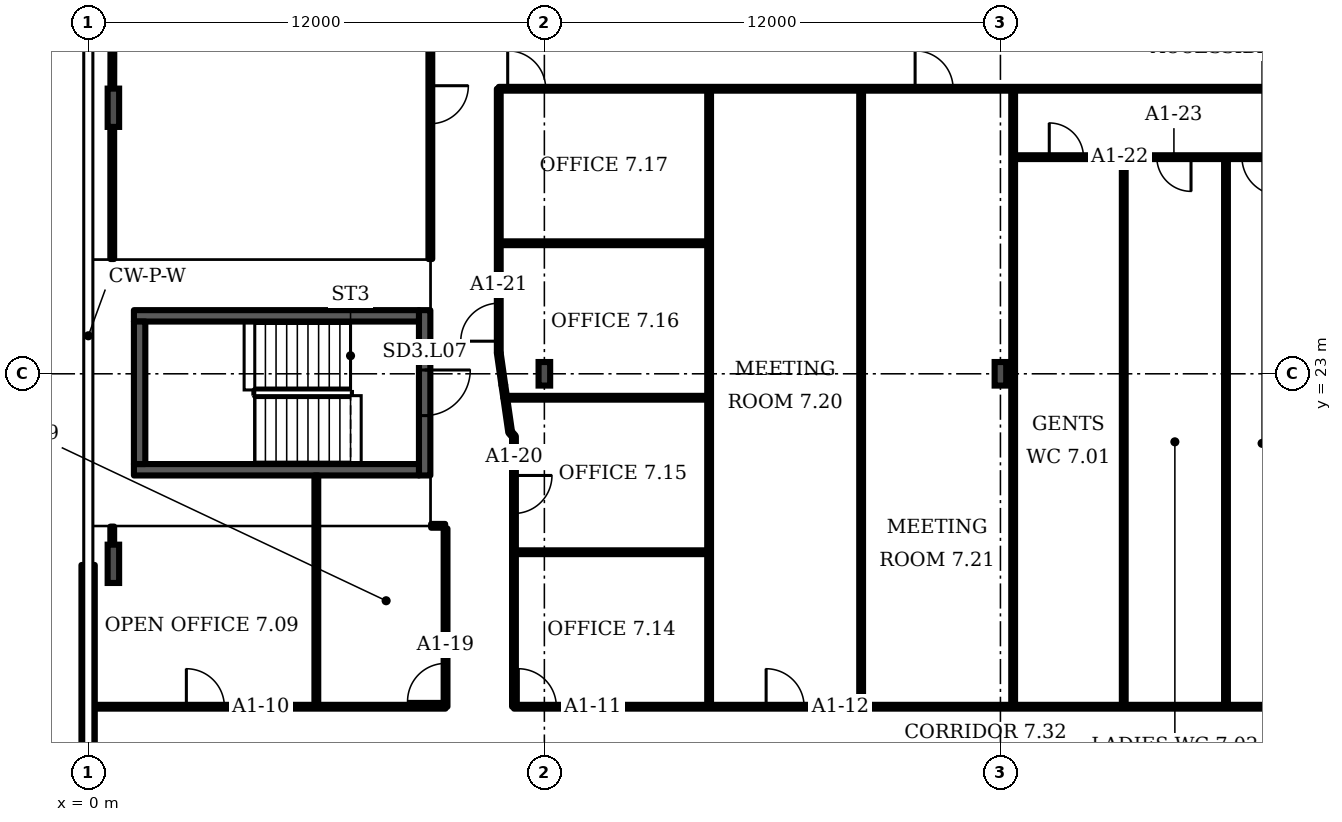
"""IFC4 building model, lengths in metres.
Left out: names, types, materials, properties, quantities, classifications, styles, units other than length and angle.
Written with IfcOpenShell. Run it as: python <this file> out.ifc"""

import sys

from ifc_helpers import new_model, si_unit, direction, frame, frame_2d, origin, origin_2d, place, context, subcontext, project, spatial, rectangle, i_section, extrude, element, fill, save


model = new_model("IFC4")
c1 = context("Model", 3, precision=1e-05, world=origin(), true_north=direction((0.0, 1.0)))
c2 = subcontext(c1, "Body", "Model", "MODEL_VIEW")
j1 = project(units=[si_unit("LENGTHUNIT", "METRE"), si_unit("PLANEANGLEUNIT", "RADIAN")], contexts=[c1])
p1 = place(None, origin())
s1 = spatial("IfcSite", under=j1, at=p1, CompositionType="ELEMENT")
p2 = place(p1, origin())
s2 = spatial("IfcBuilding", under=s1, at=p2, CompositionType="ELEMENT")
p3 = place(p2, frame((0.0, 0.0, 45.1)))
s3 = spatial("IfcBuildingStorey", under=s2, at=p3, CompositionType="ELEMENT", Elevation=45.1)
for number, where, z_axis, x_axis in (
    (1, (0.66, 30.0, 0.0), (0.0, 0.0, 1.0), (-1.0, 0.0, 0.0)),
    (2, (0.66, 18.0, 0.0), (0.0, 0.0, 1.0), (-1.0, 0.0, 0.0)),
):
    element("IfcColumn", number, at=place(p3, frame(where, z_axis=z_axis, x_axis=x_axis)), inside=s3, PredefinedType="COLUMN", context=c2, shape_type="SweptSolid", body=[
        extrude(i_section(OverallWidth=0.302, OverallDepth=1.008, WebThickness=0.021, FlangeThickness=0.04, FilletRadius=0.03, at=origin_2d()), origin(), (0.0, 0.0, 1.0), 3.6),
    ])
for number, where, z_axis, x_axis in (
    (3, (12.0, 23.0, 0.0), (0.0, 0.0, 1.0), (1.0, 0.0, 0.0)),
    (4, (24.0, 23.0, 0.0), (0.0, 0.0, 1.0), (1.0, 0.0, 0.0)),
):
    element("IfcColumn", number, at=place(p3, frame(where, z_axis=z_axis, x_axis=x_axis)), inside=s3, PredefinedType="COLUMN", context=c2, shape_type="SweptSolid", body=[
        extrude(i_section(OverallWidth=0.305, OverallDepth=0.62, WebThickness=0.021, FlangeThickness=0.04, FilletRadius=0.027, at=origin_2d()), origin(), (0.0, 0.0, 1.0), 3.6),
    ])
p4 = place(p3, frame((-0.005, 17.97, 0.0), z_axis=(0.0, 0.0, 1.0), x_axis=(0.0, -1.0, 0.0)))
e5 = element("IfcWall", 5, at=p4, inside=s3, PredefinedType="SOLIDWALL", context=c2, shape_type="SweptSolid", body=[
    extrude(rectangle(XDim=12.15, YDim=0.35, at=frame_2d((6.075, 0.0))), origin(), (0.0, 0.0, 1.0), 1.0),
])
p5 = place(p3, frame((8.85, 20.325, 0.0), z_axis=(0.0, 0.0, 1.0), x_axis=(0.0, 1.0, 0.0)))
e6 = element("IfcWall", 6, at=p5, inside=s3, PredefinedType="SHEAR", context=c2, shape_type="SweptSolid", body=[
    extrude(rectangle(XDim=4.35, YDim=0.3, at=frame_2d((2.175, 0.0))), origin(), (0.0, 0.0, 1.0), 3.2),
])
p6 = place(p5, frame((1.575, 0.0, 0.0)))
e7 = element("IfcOpeningElement", 7, at=p6, cuts=e6, PredefinedType="OPENING", context=c2, shape_type="SweptSolid", body=[
    extrude(rectangle(XDim=1.2, YDim=2.1, at=frame_2d((0.6, 1.05))), frame((0.0, 0.16, 0.0), z_axis=(0.0, -1.0, 0.0), x_axis=(1.0, 0.0, 0.0)), (0.0, 0.0, 1.0), 0.32),
])
p7 = place(p3, frame((0.02, 14.24, 0.0), z_axis=(0.0, 0.0, 1.0), x_axis=(1.0, 0.0, 0.0)))
e8 = element("IfcWall", 8, at=p7, inside=s3, PredefinedType="PARTITIONING", context=c2, shape_type="SweptSolid", body=[
    extrude(rectangle(XDim=9.38, YDim=0.1, at=frame_2d((4.69, 0.0))), origin(), (0.0, 0.0, 1.0), 3.2),
])
p8 = place(p7, frame((2.56, 0.0, 0.0)))
e9 = element("IfcOpeningElement", 9, at=p8, cuts=e8, PredefinedType="OPENING", context=c2, shape_type="SweptSolid", body=[
    extrude(rectangle(XDim=1.0, YDim=2.1, at=frame_2d((0.5, 1.05))), frame((0.0, 0.06, 0.0), z_axis=(0.0, -1.0, 0.0), x_axis=(1.0, 0.0, 0.0)), (0.0, 0.0, 1.0), 0.12),
])
p9 = place(p3, frame((0.63, 17.5, 0.0), z_axis=(0.0, 0.0, 1.0), x_axis=(0.0, 1.0, 0.0)))
e10 = element("IfcWall", 10, at=p9, inside=s3, PredefinedType="PARTITIONING", context=c2, shape_type="SweptSolid", body=[
    extrude(rectangle(XDim=1.48, YDim=0.1, at=frame_2d((0.74, 0.0))), origin(), (0.0, 0.0, 1.0), 2.58),
])
p10 = place(p3, frame((0.63, 26.02, 0.0), z_axis=(0.0, 0.0, 1.0), x_axis=(0.0, 1.0, 0.0)))
e11 = element("IfcWall", 11, at=p10, inside=s3, PredefinedType="PARTITIONING", context=c2, shape_type="SweptSolid", body=[
    extrude(rectangle(XDim=3.98, YDim=0.1, at=frame_2d((1.99, 0.0))), origin(), (0.0, 0.0, 1.0), 2.58),
])
p11 = place(p3, frame((0.63, 30.0, 0.0), z_axis=(0.0, 0.0, 1.0), x_axis=(0.00218, 0.999994, 0.0)))
e12 = element("IfcWall", 12, at=p11, inside=s3, PredefinedType="PARTITIONING", context=c2, shape_type="SweptSolid", body=[
    extrude(rectangle(XDim=11.535, YDim=0.1, at=frame_2d((5.768, 0.0))), origin(), (0.0, 0.0, 1.0), 2.58),
])
p12 = place(p3, frame((6.0, 14.24, 0.0), z_axis=(0.0, 0.0, 1.0), x_axis=(0.0, 1.0, 0.0)))
e13 = element("IfcWall", 13, at=p12, inside=s3, PredefinedType="PARTITIONING", context=c2, shape_type="SweptSolid", body=[
    extrude(rectangle(XDim=6.085, YDim=0.1, at=frame_2d((3.042, 0.0))), origin(), (0.0, 0.0, 1.0), 3.2),
])
p13 = place(p3, frame((9.0, 26.02, 0.0), z_axis=(0.0, 0.0, 1.0), x_axis=(0.0, 1.0, 0.0)))
e14 = element("IfcWall", 14, at=p13, inside=s3, PredefinedType="PARTITIONING", context=c2, shape_type="SweptSolid", body=[
    extrude(rectangle(XDim=7.96, YDim=0.1, at=frame_2d((3.98, 0.0))), origin(), (0.0, 0.0, 1.0), 3.2),
])
p14 = place(p13, frame((3.56, 0.0, 0.0)))
e15 = element("IfcOpeningElement", 15, at=p14, cuts=e14, PredefinedType="OPENING", context=c2, shape_type="SweptSolid", body=[
    extrude(rectangle(XDim=1.0, YDim=2.1, at=frame_2d((0.5, 1.05))), frame((0.0, 0.06, 0.0), z_axis=(0.0, -1.0, 0.0), x_axis=(1.0, 0.0, 0.0)), (0.0, 0.0, 1.0), 0.12),
])
p15 = place(p3, frame((9.02, 19.0, 0.0), z_axis=(0.0, 0.0, 1.0), x_axis=(1.0, 0.0, 0.0)))
e16 = element("IfcWall", 16, at=p15, inside=s3, PredefinedType="PARTITIONING", context=c2, shape_type="SweptSolid", body=[
    extrude(rectangle(XDim=0.37, YDim=0.1, at=frame_2d((0.185, 0.0))), origin(), (0.0, 0.0, 1.0), 3.2),
])
p16 = place(p3, frame((9.4, 14.24, 0.0), z_axis=(0.0, 0.0, 1.0), x_axis=(0.0, 1.0, 0.0)))
e17 = element("IfcWall", 17, at=p16, inside=s3, PredefinedType="PARTITIONING", context=c2, shape_type="SweptSolid", body=[
    extrude(rectangle(XDim=4.69, YDim=0.1, at=frame_2d((2.345, 0.0))), origin(), (0.0, 0.0, 1.0), 3.2),
])
p17 = place(p16, frame((0.14, 0.0, 0.0)))
e18 = element("IfcOpeningElement", 18, at=p17, cuts=e17, PredefinedType="OPENING", context=c2, shape_type="SweptSolid", body=[
    extrude(rectangle(XDim=1.0, YDim=2.1, at=frame_2d((0.5, 1.05))), frame((0.0, 0.06, 0.0), z_axis=(0.0, -1.0, 0.0), x_axis=(1.0, 0.0, 0.0)), (0.0, 0.0, 1.0), 0.12),
])
p18 = place(p3, frame((10.8, 23.55, 0.0), z_axis=(0.0, 0.0, 1.0), x_axis=(0.0, 1.0, 0.0)))
e19 = element("IfcWall", 19, at=p18, inside=s3, PredefinedType="PARTITIONING", context=c2, shape_type="SweptSolid", body=[
    extrude(rectangle(XDim=6.95, YDim=0.1, at=frame_2d((3.475, 0.0))), origin(), (0.0, 0.0, 1.0), 3.2),
])
p19 = place(p18, frame((0.308, 0.0, 0.0)))
e20 = element("IfcOpeningElement", 20, at=p19, cuts=e19, PredefinedType="OPENING", context=c2, shape_type="SweptSolid", body=[
    extrude(rectangle(XDim=1.0, YDim=2.1, at=frame_2d((0.5, 1.05))), frame((0.0, 0.06, 0.0), z_axis=(0.0, -1.0, 0.0), x_axis=(1.0, 0.0, 0.0)), (0.0, 0.0, 1.0), 0.12),
])
p20 = place(p3, frame((10.8, 26.435, 0.0), z_axis=(0.0, 0.0, 1.0), x_axis=(1.0, 0.0, 0.0)))
e21 = element("IfcWall", 21, at=p20, inside=s3, PredefinedType="PARTITIONING", context=c2, shape_type="SweptSolid", body=[
    extrude(rectangle(XDim=5.535, YDim=0.1, at=frame_2d((2.768, 0.0))), origin(), (0.0, 0.0, 1.0), 3.2),
])
p21 = place(p3, frame((10.8, 30.5, 0.0), z_axis=(0.0, 0.0, 1.0), x_axis=(1.0, 0.0, 0.0)))
e22 = element("IfcWall", 22, at=p21, inside=s3, PredefinedType="PARTITIONING", context=c2, shape_type="SweptSolid", body=[
    extrude(rectangle(XDim=26.05, YDim=0.1, at=frame_2d((13.025, 0.0))), origin(), (0.0, 0.0, 1.0), 3.2),
])
p22 = place(p21, frame((0.235, 0.0, 0.0)))
e23 = element("IfcOpeningElement", 23, at=p22, cuts=e22, PredefinedType="OPENING", context=c2, shape_type="SweptSolid", body=[
    extrude(rectangle(XDim=1.0, YDim=2.1, at=frame_2d((0.5, 1.05))), frame((0.0, 0.06, 0.0), z_axis=(0.0, -1.0, 0.0), x_axis=(1.0, 0.0, 0.0)), (0.0, 0.0, 1.0), 0.12),
])
p23 = place(p21, frame((10.955, 0.0, 0.0)))
e24 = element("IfcOpeningElement", 24, at=p23, cuts=e22, PredefinedType="OPENING", context=c2, shape_type="SweptSolid", body=[
    extrude(rectangle(XDim=1.0, YDim=2.1, at=frame_2d((0.5, 1.05))), frame((0.0, 0.06, 0.0), z_axis=(0.0, -1.0, 0.0), x_axis=(1.0, 0.0, 0.0)), (0.0, 0.0, 1.0), 0.12),
])
p24 = place(p3, frame((10.92, 22.705, 0.0), z_axis=(0.0, 0.0, 1.0), x_axis=(-0.14046, 0.990086, 0.0)))
e25 = element("IfcWall", 25, at=p24, inside=s3, PredefinedType="PARTITIONING", context=c2, shape_type="SweptSolid", body=[
    extrude(rectangle(XDim=0.854, YDim=0.1, at=frame_2d((0.427, 0.0))), origin(), (0.0, 0.0, 1.0), 3.2),
])
p25 = place(p3, frame((10.97, 22.37, 0.0), z_axis=(0.0, 0.0, 1.0), x_axis=(-0.147776, 0.989018, 0.0)))
e26 = element("IfcWall", 26, at=p25, inside=s3, PredefinedType="PARTITIONING", context=c2, shape_type="SweptSolid", body=[
    extrude(rectangle(XDim=0.339, YDim=0.1, at=frame_2d((0.169, 0.0))), origin(), (0.0, 0.0, 1.0), 3.2),
])
p26 = place(p3, frame((10.97, 22.37, 0.0), z_axis=(0.0, 0.0, 1.0), x_axis=(1.0, 0.0, 0.0)))
e27 = element("IfcWall", 27, at=p26, inside=s3, PredefinedType="PARTITIONING", context=c2, shape_type="SweptSolid", body=[
    extrude(rectangle(XDim=5.365, YDim=0.1, at=frame_2d((2.683, 0.0))), origin(), (0.0, 0.0, 1.0), 3.2),
])
p27 = place(p3, frame((11.1, 21.465, 0.0), z_axis=(0.0, 0.0, 1.0), x_axis=(-0.142318, 0.989818, 0.0)))
e28 = element("IfcWall", 28, at=p27, inside=s3, PredefinedType="PARTITIONING", context=c2, shape_type="SweptSolid", body=[
    extrude(rectangle(XDim=0.914, YDim=0.1, at=frame_2d((0.457, 0.0))), origin(), (0.0, 0.0, 1.0), 3.2),
])
p28 = place(p3, frame((11.2, 14.24, 0.0), z_axis=(0.0, 0.0, 1.0), x_axis=(0.0, 1.0, 0.0)))
e29 = element("IfcWall", 29, at=p28, inside=s3, PredefinedType="PARTITIONING", context=c2, shape_type="SweptSolid", body=[
    extrude(rectangle(XDim=7.11, YDim=0.1, at=frame_2d((3.555, 0.0))), origin(), (0.0, 0.0, 1.0), 3.2),
])
p29 = place(p28, frame((5.085, 0.0, 0.0)))
e30 = element("IfcOpeningElement", 30, at=p29, cuts=e29, PredefinedType="OPENING", context=c2, shape_type="SweptSolid", body=[
    extrude(rectangle(XDim=1.0, YDim=2.1, at=frame_2d((0.5, 1.05))), frame((0.0, 0.06, 0.0), z_axis=(0.0, -1.0, 0.0), x_axis=(1.0, 0.0, 0.0)), (0.0, 0.0, 1.0), 0.12),
])
p30 = place(p3, frame((11.2, 14.24, 0.0), z_axis=(0.0, 0.0, 1.0), x_axis=(1.0, 0.0, 0.0)))
e31 = element("IfcWall", 31, at=p30, inside=s3, PredefinedType="PARTITIONING", context=c2, shape_type="SweptSolid", body=[
    extrude(rectangle(XDim=51.635, YDim=0.1, at=frame_2d((25.817, 0.0))), origin(), (0.0, 0.0, 1.0), 3.2),
])
p31 = place(p30, frame((0.115, 0.0, 0.0)))
e32 = element("IfcOpeningElement", 32, at=p31, cuts=e31, PredefinedType="OPENING", context=c2, shape_type="SweptSolid", body=[
    extrude(rectangle(XDim=1.0, YDim=2.1, at=frame_2d((0.5, 1.05))), frame((0.0, 0.06, 0.0), z_axis=(0.0, -1.0, 0.0), x_axis=(1.0, 0.0, 0.0)), (0.0, 0.0, 1.0), 0.12),
])
p32 = place(p30, frame((6.635, 0.0, 0.0)))
e33 = element("IfcOpeningElement", 33, at=p32, cuts=e31, PredefinedType="OPENING", context=c2, shape_type="SweptSolid", body=[
    extrude(rectangle(XDim=1.0, YDim=2.1, at=frame_2d((0.5, 1.05))), frame((0.0, 0.06, 0.0), z_axis=(0.0, -1.0, 0.0), x_axis=(1.0, 0.0, 0.0)), (0.0, 0.0, 1.0), 0.12),
])
p33 = place(p30, frame((22.7, 0.0, 0.0)))
e34 = element("IfcOpeningElement", 34, at=p33, cuts=e31, PredefinedType="OPENING", context=c2, shape_type="SweptSolid", body=[
    extrude(rectangle(XDim=1.0, YDim=2.1, at=frame_2d((0.5, 1.05))), frame((0.0, 0.06, 0.0), z_axis=(0.0, -1.0, 0.0), x_axis=(1.0, 0.0, 0.0)), (0.0, 0.0, 1.0), 0.12),
])
p34 = place(p30, frame((27.865, 0.0, 0.0)))
e35 = element("IfcOpeningElement", 35, at=p34, cuts=e31, PredefinedType="OPENING", context=c2, shape_type="SweptSolid", body=[
    extrude(rectangle(XDim=1.0, YDim=2.1, at=frame_2d((0.5, 1.05))), frame((0.0, 0.06, 0.0), z_axis=(0.0, -1.0, 0.0), x_axis=(1.0, 0.0, 0.0)), (0.0, 0.0, 1.0), 0.12),
])
p35 = place(p30, frame((34.065, 0.0, 0.0)))
e36 = element("IfcOpeningElement", 36, at=p35, cuts=e31, PredefinedType="OPENING", context=c2, shape_type="SweptSolid", body=[
    extrude(rectangle(XDim=1.8, YDim=2.1, at=frame_2d((0.9, 1.05))), frame((0.0, 0.06, 0.0), z_axis=(0.0, -1.0, 0.0), x_axis=(1.0, 0.0, 0.0)), (0.0, 0.0, 1.0), 0.12),
])
p36 = place(p30, frame((41.765, 0.0, 0.0)))
e37 = element("IfcOpeningElement", 37, at=p36, cuts=e31, PredefinedType="OPENING", context=c2, shape_type="SweptSolid", body=[
    extrude(rectangle(XDim=1.8, YDim=2.1, at=frame_2d((0.9, 1.05))), frame((0.0, 0.06, 0.0), z_axis=(0.0, -1.0, 0.0), x_axis=(1.0, 0.0, 0.0)), (0.0, 0.0, 1.0), 0.12),
])
p37 = place(p3, frame((11.2, 18.305, 0.0), z_axis=(0.0, 0.0, 1.0), x_axis=(1.0, 0.0, 0.0)))
e38 = element("IfcWall", 38, at=p37, inside=s3, PredefinedType="PARTITIONING", context=c2, shape_type="SweptSolid", body=[
    extrude(rectangle(XDim=5.135, YDim=0.1, at=frame_2d((2.567, 0.0))), origin(), (0.0, 0.0, 1.0), 3.2),
])
p38 = place(p3, frame((11.2, 21.35, 0.0), z_axis=(0.0, 0.0, 1.0), x_axis=(-0.65566, 0.755051, 0.0)))
e39 = element("IfcWall", 39, at=p38, inside=s3, PredefinedType="PARTITIONING", context=c2, shape_type="SweptSolid", body=[
    extrude(rectangle(XDim=0.152, YDim=0.1, at=frame_2d((0.076, 0.0))), origin(), (0.0, 0.0, 1.0), 3.2),
])
for number, where, z_axis, x_axis in (
    (40, (16.335, 14.24, 0.0), (0.0, 0.0, 1.0), (0.0, 1.0, 0.0)),
    (41, (20.335, 14.24, 0.0), (0.0, 0.0, 1.0), (0.0, 1.0, 0.0)),
):
    element("IfcWall", number, at=place(p3, frame(where, z_axis=z_axis, x_axis=x_axis)), inside=s3, PredefinedType="PARTITIONING", context=c2, shape_type="SweptSolid", body=[
        extrude(rectangle(XDim=16.26, YDim=0.1, at=frame_2d((8.13, 0.0))), origin(), (0.0, 0.0, 1.0), 3.2),
    ])
p39 = place(p3, frame((24.335, 14.24, 0.0), z_axis=(0.0, 0.0, 1.0), x_axis=(0.0, 1.0, 0.0)))
e42 = element("IfcWall", 42, at=p39, inside=s3, PredefinedType="PARTITIONING", context=c2, shape_type="SweptSolid", body=[
    extrude(rectangle(XDim=16.25, YDim=0.1, at=frame_2d((8.125, 0.0))), origin(), (0.0, 0.0, 1.0), 3.2),
])
p40 = place(p3, frame((24.335, 28.7, 0.0), z_axis=(0.0, 0.0, 1.0), x_axis=(1.0, 0.0, 0.0)))
e43 = element("IfcWall", 43, at=p40, inside=s3, PredefinedType="PARTITIONING", context=c2, shape_type="SweptSolid", body=[
    extrude(rectangle(XDim=7.5, YDim=0.1, at=frame_2d((3.75, 0.0))), origin(), (0.0, 0.0, 1.0), 3.2),
])
p41 = place(p40, frame((0.95, 0.0, 0.0)))
e44 = element("IfcOpeningElement", 44, at=p41, cuts=e43, PredefinedType="OPENING", context=c2, shape_type="SweptSolid", body=[
    extrude(rectangle(XDim=0.9, YDim=2.1, at=frame_2d((0.45, 1.05))), frame((0.0, 0.06, 0.0), z_axis=(0.0, -1.0, 0.0), x_axis=(1.0, 0.0, 0.0)), (0.0, 0.0, 1.0), 0.12),
])
p42 = place(p40, frame((3.78, 0.0, 0.0)))
e45 = element("IfcOpeningElement", 45, at=p42, cuts=e43, PredefinedType="OPENING", context=c2, shape_type="SweptSolid", body=[
    extrude(rectangle(XDim=0.9, YDim=2.1, at=frame_2d((0.45, 1.05))), frame((0.0, 0.06, 0.0), z_axis=(0.0, -1.0, 0.0), x_axis=(1.0, 0.0, 0.0)), (0.0, 0.0, 1.0), 0.12),
])
p43 = place(p40, frame((6.02, 0.0, 0.0)))
e46 = element("IfcOpeningElement", 46, at=p43, cuts=e43, PredefinedType="OPENING", context=c2, shape_type="SweptSolid", body=[
    extrude(rectangle(XDim=1.0, YDim=2.1, at=frame_2d((0.5, 1.05))), frame((0.0, 0.06, 0.0), z_axis=(0.0, -1.0, 0.0), x_axis=(1.0, 0.0, 0.0)), (0.0, 0.0, 1.0), 0.12),
])
for number, where, z_axis, x_axis in (
    (47, (27.245, 14.24, 0.0), (0.0, 0.0, 1.0), (0.0, 1.0, 0.0)),
    (48, (29.935, 14.24, 0.0), (0.0, 0.0, 1.0), (0.0, 1.0, 0.0)),
):
    element("IfcWall", number, at=place(p3, frame(where, z_axis=z_axis, x_axis=x_axis)), inside=s3, PredefinedType="PARTITIONING", context=c2, shape_type="SweptSolid", body=[
        extrude(rectangle(XDim=14.46, YDim=0.1, at=frame_2d((7.23, 0.0))), origin(), (0.0, 0.0, 1.0), 3.2),
    ])
for number, where, z_axis, x_axis in (
    (49, (1.2, 20.475, 0.0), (0.0, 0.0, 1.0), (1.0, 0.0, 0.0)),
    (50, (1.2, 24.525, 0.0), (0.0, 0.0, 1.0), (1.0, 0.0, 0.0)),
):
    element("IfcWall", number, at=place(p3, frame(where, z_axis=z_axis, x_axis=x_axis)), inside=s3, PredefinedType="SHEAR", context=c2, shape_type="SweptSolid", body=[
        extrude(rectangle(XDim=7.5, YDim=0.3, at=frame_2d((3.75, 0.0))), origin(), (0.0, 0.0, 1.0), 3.2),
    ])
p44 = place(p3, frame((1.35, 20.625, 0.0), z_axis=(0.0, 0.0, 1.0), x_axis=(0.0, 1.0, 0.0)))
e51 = element("IfcWall", 51, at=p44, inside=s3, PredefinedType="SHEAR", context=c2, shape_type="SweptSolid", body=[
    extrude(rectangle(XDim=3.75, YDim=0.3, at=frame_2d((1.875, 0.0))), origin(), (0.0, 0.0, 1.0), 3.2),
])
p45 = place(p6, origin())
e52 = element("IfcDoor", 52, at=p45, inside=s3, OperationType="SINGLE_SWING_RIGHT", PredefinedType="DOOR", context=c2, shape_type="SweptSolid", body=[
    extrude(rectangle(XDim=1.2, YDim=2.1, at=frame_2d((0.6, 1.05))), frame((0.0, 0.025, 0.0), z_axis=(0.0, -1.0, 0.0), x_axis=(1.0, 0.0, 0.0)), (0.0, 0.0, 1.0), 0.05),
])
fill(e7, e52)
p46 = place(p8, origin())
e53 = element("IfcDoor", 53, at=p46, inside=s3, OperationType="SINGLE_SWING_LEFT", PredefinedType="DOOR", context=c2, shape_type="SweptSolid", body=[
    extrude(rectangle(XDim=1.0, YDim=2.1, at=frame_2d((0.5, 1.05))), frame((0.0, 0.025, 0.0), z_axis=(0.0, -1.0, 0.0), x_axis=(1.0, 0.0, 0.0)), (0.0, 0.0, 1.0), 0.05),
])
fill(e9, e53)
p47 = place(p31, origin())
e54 = element("IfcDoor", 54, at=p47, inside=s3, OperationType="SINGLE_SWING_LEFT", PredefinedType="DOOR", context=c2, shape_type="SweptSolid", body=[
    extrude(rectangle(XDim=1.0, YDim=2.1, at=frame_2d((0.5, 1.05))), frame((0.0, 0.025, 0.0), z_axis=(0.0, -1.0, 0.0), x_axis=(1.0, 0.0, 0.0)), (0.0, 0.0, 1.0), 0.05),
])
fill(e32, e54)
p48 = place(p32, origin())
e55 = element("IfcDoor", 55, at=p48, inside=s3, OperationType="SINGLE_SWING_LEFT", PredefinedType="DOOR", context=c2, shape_type="SweptSolid", body=[
    extrude(rectangle(XDim=1.0, YDim=2.1, at=frame_2d((0.5, 1.05))), frame((0.0, 0.025, 0.0), z_axis=(0.0, -1.0, 0.0), x_axis=(1.0, 0.0, 0.0)), (0.0, 0.0, 1.0), 0.05),
])
fill(e33, e55)
p49 = place(p17, origin())
e56 = element("IfcDoor", 56, at=p49, inside=s3, OperationType="SINGLE_SWING_LEFT", PredefinedType="DOOR", context=c2, shape_type="SweptSolid", body=[
    extrude(rectangle(XDim=1.0, YDim=2.1, at=frame_2d((0.5, 1.05))), frame((0.0, 0.025, 0.0), z_axis=(0.0, -1.0, 0.0), x_axis=(1.0, 0.0, 0.0)), (0.0, 0.0, 1.0), 0.05),
])
fill(e18, e56)
p50 = place(p29, origin())
e57 = element("IfcDoor", 57, at=p50, inside=s3, OperationType="SINGLE_SWING_RIGHT", PredefinedType="DOOR", context=c2, shape_type="SweptSolid", body=[
    extrude(rectangle(XDim=1.0, YDim=2.1, at=frame_2d((0.5, 1.05))), frame((0.0, 0.025, 0.0), z_axis=(0.0, -1.0, 0.0), x_axis=(1.0, 0.0, 0.0)), (0.0, 0.0, 1.0), 0.05),
])
fill(e30, e57)
p51 = place(p19, origin())
e58 = element("IfcDoor", 58, at=p51, inside=s3, OperationType="SINGLE_SWING_LEFT", PredefinedType="DOOR", context=c2, shape_type="SweptSolid", body=[
    extrude(rectangle(XDim=1.0, YDim=2.1, at=frame_2d((0.5, 1.05))), frame((0.0, 0.025, 0.0), z_axis=(0.0, -1.0, 0.0), x_axis=(1.0, 0.0, 0.0)), (0.0, 0.0, 1.0), 0.05),
])
fill(e20, e58)
p52 = place(p41, origin())
e59 = element("IfcDoor", 59, at=p52, inside=s3, OperationType="SINGLE_SWING_LEFT", PredefinedType="DOOR", context=c2, shape_type="SweptSolid", body=[
    extrude(rectangle(XDim=0.9, YDim=2.1, at=frame_2d((0.45, 1.05))), frame((0.0, 0.025, 0.0), z_axis=(0.0, -1.0, 0.0), x_axis=(1.0, 0.0, 0.0)), (0.0, 0.0, 1.0), 0.05),
])
fill(e44, e59)
p53 = place(p42, origin())
e60 = element("IfcDoor", 60, at=p53, inside=s3, OperationType="SINGLE_SWING_RIGHT", PredefinedType="DOOR", context=c2, shape_type="SweptSolid", body=[
    extrude(rectangle(XDim=0.9, YDim=2.1, at=frame_2d((0.45, 1.05))), frame((0.0, 0.025, 0.0), z_axis=(0.0, -1.0, 0.0), x_axis=(1.0, 0.0, 0.0)), (0.0, 0.0, 1.0), 0.05),
])
fill(e45, e60)
p54 = place(p43, origin())
e61 = element("IfcDoor", 61, at=p54, inside=s3, OperationType="SINGLE_SWING_RIGHT", PredefinedType="DOOR", context=c2, shape_type="SweptSolid", body=[
    extrude(rectangle(XDim=1.0, YDim=2.1, at=frame_2d((0.5, 1.05))), frame((0.0, 0.025, 0.0), z_axis=(0.0, -1.0, 0.0), x_axis=(1.0, 0.0, 0.0)), (0.0, 0.0, 1.0), 0.05),
])
fill(e46, e61)
p55 = place(p14, origin())
e62 = element("IfcDoor", 62, at=p55, inside=s3, OperationType="SINGLE_SWING_RIGHT", PredefinedType="DOOR", context=c2, shape_type="SweptSolid", body=[
    extrude(rectangle(XDim=1.0, YDim=2.1, at=frame_2d((0.5, 1.05))), frame((0.0, 0.025, 0.0), z_axis=(0.0, -1.0, 0.0), x_axis=(1.0, 0.0, 0.0)), (0.0, 0.0, 1.0), 0.05),
])
fill(e15, e62)
p56 = place(p22, origin())
e63 = element("IfcDoor", 63, at=p56, inside=s3, OperationType="SINGLE_SWING_LEFT", PredefinedType="DOOR", context=c2, shape_type="SweptSolid", body=[
    extrude(rectangle(XDim=1.0, YDim=2.1, at=frame_2d((0.5, 1.05))), frame((0.0, 0.025, 0.0), z_axis=(0.0, -1.0, 0.0), x_axis=(1.0, 0.0, 0.0)), (0.0, 0.0, 1.0), 0.05),
])
fill(e23, e63)
p57 = place(p23, origin())
e64 = element("IfcDoor", 64, at=p57, inside=s3, OperationType="SINGLE_SWING_LEFT", PredefinedType="DOOR", context=c2, shape_type="SweptSolid", body=[
    extrude(rectangle(XDim=1.0, YDim=2.1, at=frame_2d((0.5, 1.05))), frame((0.0, 0.025, 0.0), z_axis=(0.0, -1.0, 0.0), x_axis=(1.0, 0.0, 0.0)), (0.0, 0.0, 1.0), 0.05),
])
fill(e24, e64)
save(model, sys.argv[1])
